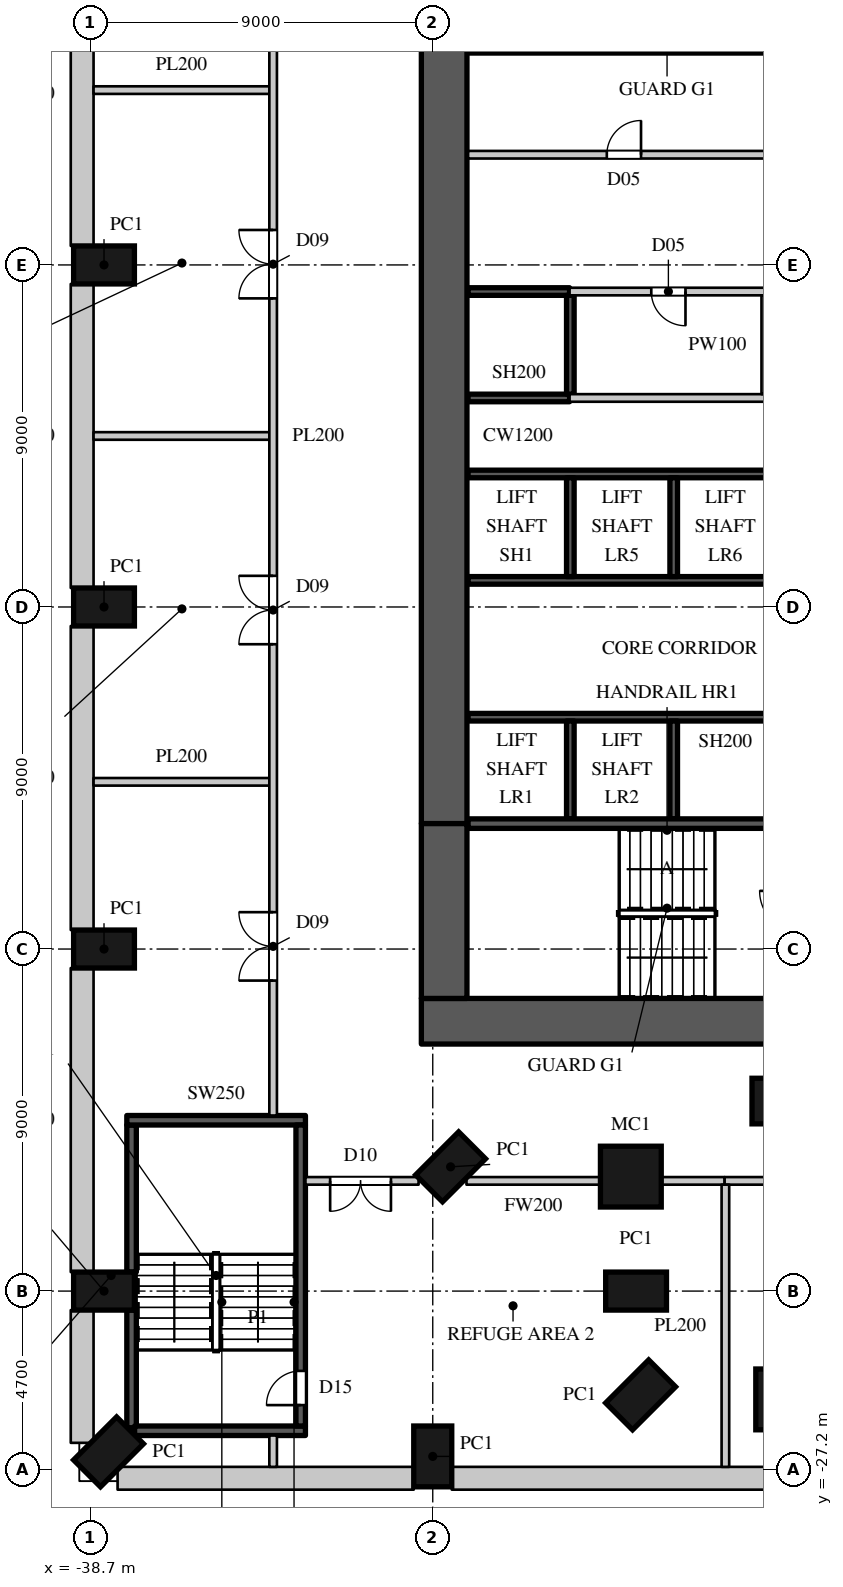
"""IFC4 building model, lengths in metres.
Left out: names, types, materials, properties, quantities, classifications, styles, units other than length and angle.
Written with IfcOpenShell. Run it as: python <this file> out.ifc"""

import sys

from ifc_helpers import new_model, si_unit, direction, frame, frame_2d, origin, origin_2d, place, context, subcontext, project, spatial, rectangle, circle, extrude, element, fill, save


model = new_model("IFC4")
c1 = context("Model", 3, precision=1e-05, world=origin(), true_north=direction((0.0, 1.0)))
c2 = subcontext(c1, "Body", "Model", "MODEL_VIEW")
j1 = project(units=[si_unit("LENGTHUNIT", "METRE"), si_unit("PLANEANGLEUNIT", "RADIAN")], contexts=[c1])
p1 = place(None, origin())
s1 = spatial("IfcSite", under=j1, at=p1, CompositionType="ELEMENT")
p2 = place(p1, origin())
s2 = spatial("IfcBuilding", under=s1, at=p2, CompositionType="ELEMENT")
p3 = place(p2, frame((0.0, 0.0, 29.0)))
s3 = spatial("IfcBuildingStorey", under=s2, at=p3, CompositionType="ELEMENT", Elevation=29.0)
p4 = place(p3, frame((-29.231, -19.231, 0.0), z_axis=(0.0, 0.0, 1.0), x_axis=(0.707106781187, -0.707106781187, 0.0)))
e1 = element("IfcColumn", 1, at=p4, inside=s3, PredefinedType="COLUMN", context=c2, shape_type="SweptSolid", body=[
    extrude(rectangle(XDim=1.0, YDim=1.6, at=origin_2d()), origin(), (0.0, 0.0, 1.0), 7.0),
])
p5 = place(p3, frame((-24.488, -19.488, 0.0), z_axis=(0.0, 0.0, 1.0), x_axis=(1.0, 0.0, 0.0)))
e2 = element("IfcColumn", 2, at=p5, inside=s3, PredefinedType="COLUMN", context=c2, shape_type="SweptSolid", body=[
    extrude(circle(Radius=0.8, at=origin_2d()), origin(), (0.0, 0.0, 1.0), 7.0),
])
for number, where, z_axis, x_axis in (
    (3, (-24.35, -22.5, 0.0), (0.0, 0.0, 1.0), (0.0, -1.0, 0.0)),
    (4, (-24.231, -25.231, 0.0), (0.0, 0.0, 1.0), (0.707, -0.707, 0.0)),
    (5, (-20.7, -25.35, 0.0), (0.0, 0.0, 1.0), (1.0, 0.0, 0.0)),
    (6, (-38.231, -26.731, 0.0), (0.0, 0.0, 1.0), (0.707, -0.707, 0.0)),
    (7, (-29.7, -26.85, 0.0), (0.0, 0.0, 1.0), (1.0, 0.0, 0.0)),
    (8, (-38.35, 4.5, 0.0), (0.0, 0.0, 1.0), (0.0, -1.0, 0.0)),
    (9, (-38.35, -4.5, 0.0), (0.0, 0.0, 1.0), (0.0, -1.0, 0.0)),
    (10, (-38.35, -13.5, 0.0), (0.0, 0.0, 1.0), (0.0, -1.0, 0.0)),
    (11, (-38.35, -22.5, 0.0), (0.0, 0.0, 1.0), (0.0, -1.0, 0.0)),
):
    element("IfcColumn", number, at=place(p3, frame(where, z_axis=z_axis, x_axis=x_axis)), inside=s3, PredefinedType="COLUMN", context=c2, shape_type="SweptSolid", body=[
        extrude(rectangle(XDim=1.0, YDim=1.6, at=origin_2d()), origin(), (0.0, 0.0, 1.0), 7.0),
    ])
p6 = place(p3, frame((-20.7, -17.5, 0.0), z_axis=(0.0, 0.0, 1.0), x_axis=(1.0, 0.0, 0.0)))
e12 = element("IfcColumn", 12, at=p6, inside=s3, PredefinedType="COLUMN", context=c2, shape_type="SweptSolid", body=[
    extrude(circle(Radius=0.6, at=origin_2d()), origin(), (0.0, 0.0, 1.0), 7.0),
])
p7 = place(p3, frame((-37.993, -27.425, 0.0), z_axis=(0.0, 0.0, 1.0), x_axis=(1.0, 0.0, 0.0)))
e13 = element("IfcWall", 13, at=p7, inside=s3, PredefinedType="ELEMENTEDWALL", context=c2, shape_type="SweptSolid", body=[
    extrude(rectangle(XDim=7.793, YDim=0.6, at=frame_2d((3.896, 0.0))), origin(), (0.0, 0.0, 1.0), 6.6),
])
p8 = place(p3, frame((-29.2, -27.425, 0.0), z_axis=(0.0, 0.0, 1.0), x_axis=(1.0, 0.0, 0.0)))
e14 = element("IfcWall", 14, at=p8, inside=s3, PredefinedType="ELEMENTEDWALL", context=c2, shape_type="SweptSolid", body=[
    extrude(rectangle(XDim=53.0, YDim=0.6, at=frame_2d((26.5, 0.0))), origin(), (0.0, 0.0, 1.0), 6.6),
])
for number, where, z_axis, x_axis in (
    (15, (-38.925, 13.0, 0.0), (0.0, 0.0, 1.0), (0.0, -1.0, 0.0)),
    (16, (-38.925, 4.0, 0.0), (0.0, 0.0, 1.0), (0.0, -1.0, 0.0)),
    (17, (-38.925, -5.0, 0.0), (0.0, 0.0, 1.0), (0.0, -1.0, 0.0)),
    (18, (-38.925, -14.0, 0.0), (0.0, 0.0, 1.0), (0.0, -1.0, 0.0)),
):
    element("IfcWall", number, at=place(p3, frame(where, z_axis=z_axis, x_axis=x_axis)), inside=s3, PredefinedType="ELEMENTEDWALL", context=c2, shape_type="SweptSolid", body=[
        extrude(rectangle(XDim=8.0, YDim=0.6, at=frame_2d((4.0, 0.0))), origin(), (0.0, 0.0, 1.0), 6.6),
    ])
p9 = place(p3, frame((-38.925, -23.0, 0.0), z_axis=(0.0, 0.0, 1.0), x_axis=(0.0, -1.0, 0.0)))
e19 = element("IfcWall", 19, at=p9, inside=s3, PredefinedType="ELEMENTEDWALL", context=c2, shape_type="SweptSolid", body=[
    extrude(rectangle(XDim=3.493, YDim=0.6, at=frame_2d((1.747, 0.0))), origin(), (0.0, 0.0, 1.0), 6.6),
])
p10 = place(p3, frame((-30.0, -15.4, 0.0), z_axis=(0.0, 0.0, 1.0), x_axis=(1.0, 0.0, 0.0)))
e20 = element("IfcWall", 20, at=p10, inside=s3, PredefinedType="SHEAR", context=c2, shape_type="SweptSolid", body=[
    extrude(rectangle(XDim=16.0, YDim=1.2, at=frame_2d((8.0, 0.0))), origin(), (0.0, 0.0, 1.0), 7.0),
])
p11 = place(p3, frame((-29.4, -10.2, 0.0), z_axis=(0.0, 0.0, 1.0), x_axis=(0.0, 1.0, 0.0)))
e21 = element("IfcWall", 21, at=p11, inside=s3, PredefinedType="SHEAR", context=c2, shape_type="SweptSolid", body=[
    extrude(rectangle(XDim=20.4, YDim=1.2, at=frame_2d((10.2, 0.0))), origin(), (0.0, 0.0, 1.0), 7.0),
])
p12 = place(p3, frame((-29.4, -14.8, 0.0), z_axis=(0.0, 0.0, 1.0), x_axis=(0.0, 1.0, 0.0)))
e22 = element("IfcWall", 22, at=p12, inside=s3, PredefinedType="SHEAR", context=c2, shape_type="SweptSolid", body=[
    extrude(rectangle(XDim=4.6, YDim=1.2, at=frame_2d((2.3, 0.0))), origin(), (0.0, 0.0, 1.0), 7.0),
])
p13 = place(p3, frame((-33.05, -19.6, 0.0), z_axis=(0.0, 0.0, 1.0), x_axis=(1.0, 0.0, 0.0)))
e23 = element("IfcWall", 23, at=p13, inside=s3, PredefinedType="PARTITIONING", context=c2, shape_type="SweptSolid", body=[
    extrude(rectangle(XDim=2.977, YDim=0.2, at=frame_2d((1.489, 0.0))), origin(), (0.0, 0.0, 1.0), 6.598),
])
p14 = place(p13, frame((0.65, 0.0, 0.0)))
e24 = element("IfcOpeningElement", 24, at=p14, cuts=e23, PredefinedType="OPENING", context=c2, shape_type="SweptSolid", body=[
    extrude(rectangle(XDim=1.6, YDim=2.4, at=frame_2d((0.8, 1.2))), frame((0.0, 0.11, 0.0), z_axis=(0.0, -1.0, 0.0), x_axis=(1.0, 0.0, 0.0)), (0.0, 0.0, 1.0), 0.22),
])
p15 = place(p3, frame((-28.813, -19.6, 0.0), z_axis=(0.0, 0.0, 1.0), x_axis=(1.0, 0.0, 0.0)))
e25 = element("IfcWall", 25, at=p15, inside=s3, PredefinedType="PARTITIONING", context=c2, shape_type="SweptSolid", body=[
    extrude(rectangle(XDim=3.526, YDim=0.2, at=frame_2d((1.763, 0.0))), origin(), (0.0, 0.0, 1.0), 6.598),
])
p16 = place(p3, frame((-23.689, -19.6, 0.0), z_axis=(0.0, 0.0, 1.0), x_axis=(1.0, 0.0, 0.0)))
e26 = element("IfcWall", 26, at=p16, inside=s3, PredefinedType="PARTITIONING", context=c2, shape_type="SweptSolid", body=[
    extrude(rectangle(XDim=1.669, YDim=0.2, at=frame_2d((0.834, 0.0))), origin(), (0.0, 0.0, 1.0), 6.598),
])
p17 = place(p3, frame((-28.77, 7.4, 0.0), z_axis=(0.0, 0.0, 1.0), x_axis=(1.0, 0.0, 0.0)))
e27 = element("IfcWall", 27, at=p17, inside=s3, PredefinedType="PARTITIONING", context=c2, shape_type="SweptSolid", body=[
    extrude(rectangle(XDim=8.15, YDim=0.2, at=frame_2d((4.075, 0.0))), origin(), (0.0, 0.0, 1.0), 6.598),
])
p18 = place(p17, frame((3.65, 0.0, 0.0)))
e28 = element("IfcOpeningElement", 28, at=p18, cuts=e27, PredefinedType="OPENING", context=c2, shape_type="SweptSolid", body=[
    extrude(rectangle(XDim=0.9, YDim=2.2, at=frame_2d((0.45, 1.1))), frame((0.0, 0.11, 0.0), z_axis=(0.0, -1.0, 0.0), x_axis=(1.0, 0.0, 0.0)), (0.0, 0.0, 1.0), 0.22),
])
p19 = place(p3, frame((-26.1, 3.8, 0.0), z_axis=(0.0, 0.0, 1.0), x_axis=(1.0, 0.0, 0.0)))
e29 = element("IfcWall", 29, at=p19, inside=s3, PredefinedType="PARTITIONING", context=c2, shape_type="SweptSolid", body=[
    extrude(rectangle(XDim=10.87, YDim=0.2, at=frame_2d((5.435, 0.0))), origin(), (0.0, 0.0, 1.0), 6.598),
])
p20 = place(p19, frame((2.15, 0.0, 0.0)))
e30 = element("IfcOpeningElement", 30, at=p20, cuts=e29, PredefinedType="OPENING", context=c2, shape_type="SweptSolid", body=[
    extrude(rectangle(XDim=0.9, YDim=2.2, at=frame_2d((0.45, 1.1))), frame((0.0, 0.11, 0.0), z_axis=(0.0, -1.0, 0.0), x_axis=(1.0, 0.0, 0.0)), (0.0, 0.0, 1.0), 0.22),
])
p21 = place(p19, frame((7.45, 0.0, 0.0)))
e31 = element("IfcOpeningElement", 31, at=p21, cuts=e29, PredefinedType="OPENING", context=c2, shape_type="SweptSolid", body=[
    extrude(rectangle(XDim=0.9, YDim=2.2, at=frame_2d((0.45, 1.1))), frame((0.0, 0.11, 0.0), z_axis=(0.0, -1.0, 0.0), x_axis=(1.0, 0.0, 0.0)), (0.0, 0.0, 1.0), 0.22),
])
for number, where, z_axis, x_axis in (
    (32, (-38.625, -9.1, 0.0), (0.0, 0.0, 1.0), (1.0, 0.0, 0.0)),
    (33, (-38.625, 0.0, 0.0), (0.0, 0.0, 1.0), (1.0, 0.0, 0.0)),
    (34, (-38.625, 9.1, 0.0), (0.0, 0.0, 1.0), (1.0, 0.0, 0.0)),
):
    element("IfcWall", number, at=place(p3, frame(where, z_axis=z_axis, x_axis=x_axis)), inside=s3, PredefinedType="PARTITIONING", context=c2, shape_type="SweptSolid", body=[
        extrude(rectangle(XDim=4.625, YDim=0.2, at=frame_2d((2.312, 0.0))), origin(), (0.0, 0.0, 1.0), 6.598),
    ])
p22 = place(p3, frame((-33.9, -27.125, 0.0), z_axis=(0.0, 0.0, 1.0), x_axis=(0.0, 1.0, 0.0)))
e35 = element("IfcWall", 35, at=p22, inside=s3, PredefinedType="PARTITIONING", context=c2, shape_type="SweptSolid", body=[
    extrude(rectangle(XDim=0.825, YDim=0.2, at=frame_2d((0.413, 0.0))), origin(), (0.0, 0.0, 1.0), 6.598),
])
p23 = place(p3, frame((-33.9, -17.88, 0.0), z_axis=(0.0, 0.0, 1.0), x_axis=(0.0, 1.0, 0.0)))
e36 = element("IfcWall", 36, at=p23, inside=s3, PredefinedType="PARTITIONING", context=c2, shape_type="SweptSolid", body=[
    extrude(rectangle(XDim=35.76, YDim=0.2, at=frame_2d((17.88, 0.0))), origin(), (0.0, 0.0, 1.0), 6.598),
])
p24 = place(p23, frame((3.55, 0.0, 0.0)))
e37 = element("IfcOpeningElement", 37, at=p24, cuts=e36, PredefinedType="OPENING", context=c2, shape_type="SweptSolid", body=[
    extrude(rectangle(XDim=1.8, YDim=2.4, at=frame_2d((0.9, 1.2))), frame((0.0, 0.11, 0.0), z_axis=(0.0, -1.0, 0.0), x_axis=(1.0, 0.0, 0.0)), (0.0, 0.0, 1.0), 0.22),
])
p25 = place(p23, frame((12.4, 0.0, 0.0)))
e38 = element("IfcOpeningElement", 38, at=p25, cuts=e36, PredefinedType="OPENING", context=c2, shape_type="SweptSolid", body=[
    extrude(rectangle(XDim=1.8, YDim=2.4, at=frame_2d((0.9, 1.2))), frame((0.0, 0.11, 0.0), z_axis=(0.0, -1.0, 0.0), x_axis=(1.0, 0.0, 0.0)), (0.0, 0.0, 1.0), 0.22),
])
p26 = place(p23, frame((21.5, 0.0, 0.0)))
e39 = element("IfcOpeningElement", 39, at=p26, cuts=e36, PredefinedType="OPENING", context=c2, shape_type="SweptSolid", body=[
    extrude(rectangle(XDim=1.8, YDim=2.4, at=frame_2d((0.9, 1.2))), frame((0.0, 0.11, 0.0), z_axis=(0.0, -1.0, 0.0), x_axis=(1.0, 0.0, 0.0)), (0.0, 0.0, 1.0), 0.22),
])
p27 = place(p23, frame((30.4, 0.0, 0.0)))
e40 = element("IfcOpeningElement", 40, at=p27, cuts=e36, PredefinedType="OPENING", context=c2, shape_type="SweptSolid", body=[
    extrude(rectangle(XDim=1.8, YDim=2.4, at=frame_2d((0.9, 1.2))), frame((0.0, 0.11, 0.0), z_axis=(0.0, -1.0, 0.0), x_axis=(1.0, 0.0, 0.0)), (0.0, 0.0, 1.0), 0.22),
])
p28 = place(p3, frame((-26.1, 1.0, 0.0), z_axis=(0.0, 0.0, 1.0), x_axis=(1.0, 0.0, 0.0)))
e41 = element("IfcWall", 41, at=p28, inside=s3, PredefinedType="PARTITIONING", context=c2, shape_type="SweptSolid", body=[
    extrude(rectangle(XDim=10.87, YDim=0.2, at=frame_2d((5.435, 0.0))), origin(), (0.0, 0.0, 1.0), 6.598),
])
p29 = place(p3, frame((-22.02, -19.6, 0.0), z_axis=(0.0, 0.0, 1.0), x_axis=(1.0, 0.0, 0.0)))
e42 = element("IfcWall", 42, at=p29, inside=s3, PredefinedType="PARTITIONING", context=c2, shape_type="SweptSolid", body=[
    extrude(rectangle(XDim=9.02, YDim=0.2, at=frame_2d((4.51, 0.0))), origin(), (0.0, 0.0, 1.0), 6.598),
])
p30 = place(p29, frame((3.6, 0.0, 0.0)))
e43 = element("IfcOpeningElement", 43, at=p30, cuts=e42, PredefinedType="OPENING", context=c2, shape_type="SweptSolid", body=[
    extrude(rectangle(XDim=1.8, YDim=2.4, at=frame_2d((0.9, 1.2))), frame((0.0, 0.11, 0.0), z_axis=(0.0, -1.0, 0.0), x_axis=(1.0, 0.0, 0.0)), (0.0, 0.0, 1.0), 0.22),
])
p31 = place(p3, frame((-22.0, -27.125, 0.0), z_axis=(0.0, 0.0, 1.0), x_axis=(0.0, 1.0, 0.0)))
e44 = element("IfcWall", 44, at=p31, inside=s3, PredefinedType="PARTITIONING", context=c2, shape_type="SweptSolid", body=[
    extrude(rectangle(XDim=7.425, YDim=0.2, at=frame_2d((3.712, 0.0))), origin(), (0.0, 0.0, 1.0), 6.598),
])
for number, where, z_axis, x_axis in (
    (45, (-28.77, -7.4, 0.0), (0.0, 0.0, 1.0), (1.0, 0.0, 0.0)),
    (46, (-28.77, -3.8, 0.0), (0.0, 0.0, 1.0), (1.0, 0.0, 0.0)),
    (47, (-28.77, -1.0, 0.0), (0.0, 0.0, 1.0), (1.0, 0.0, 0.0)),
):
    element("IfcWall", number, at=place(p3, frame(where, z_axis=z_axis, x_axis=x_axis)), inside=s3, PredefinedType="SHEAR", context=c2, shape_type="SweptSolid", body=[
        extrude(rectangle(XDim=13.54, YDim=0.2, at=frame_2d((6.77, 0.0))), origin(), (0.0, 0.0, 1.0), 6.598),
    ])
for number, where, z_axis, x_axis in (
    (48, (-28.77, 1.0, 0.0), (0.0, 0.0, 1.0), (1.0, 0.0, 0.0)),
    (49, (-28.77, 3.8, 0.0), (0.0, 0.0, 1.0), (1.0, 0.0, 0.0)),
):
    element("IfcWall", number, at=place(p3, frame(where, z_axis=z_axis, x_axis=x_axis)), inside=s3, PredefinedType="SHEAR", context=c2, shape_type="SweptSolid", body=[
        extrude(rectangle(XDim=2.67, YDim=0.2, at=frame_2d((1.335, 0.0))), origin(), (0.0, 0.0, 1.0), 6.598),
    ])
p32 = place(p3, frame((-26.08, -10.075, 0.0), z_axis=(0.0, 0.0, 1.0), x_axis=(0.0, 1.0, 0.0)))
e50 = element("IfcWall", 50, at=p32, inside=s3, PredefinedType="SHEAR", context=c2, shape_type="SweptSolid", body=[
    extrude(rectangle(XDim=2.575, YDim=0.2, at=frame_2d((1.288, 0.0))), origin(), (0.0, 0.0, 1.0), 7.0),
])
p33 = place(p3, frame((-26.08, -3.7, 0.0), z_axis=(0.0, 0.0, 1.0), x_axis=(0.0, 1.0, 0.0)))
e51 = element("IfcWall", 51, at=p33, inside=s3, PredefinedType="SHEAR", context=c2, shape_type="SweptSolid", body=[
    extrude(rectangle(XDim=2.6, YDim=0.2, at=frame_2d((1.3, 0.0))), origin(), (0.0, 0.0, 1.0), 7.0),
])
p34 = place(p3, frame((-26.08, 1.1, 0.0), z_axis=(0.0, 0.0, 1.0), x_axis=(0.0, 1.0, 0.0)))
e52 = element("IfcWall", 52, at=p34, inside=s3, PredefinedType="SHEAR", context=c2, shape_type="SweptSolid", body=[
    extrude(rectangle(XDim=2.6, YDim=0.2, at=frame_2d((1.3, 0.0))), origin(), (0.0, 0.0, 1.0), 6.598),
])
p35 = place(p3, frame((-23.36, -10.075, 0.0), z_axis=(0.0, 0.0, 1.0), x_axis=(0.0, 1.0, 0.0)))
e53 = element("IfcWall", 53, at=p35, inside=s3, PredefinedType="SHEAR", context=c2, shape_type="SweptSolid", body=[
    extrude(rectangle(XDim=2.575, YDim=0.2, at=frame_2d((1.288, 0.0))), origin(), (0.0, 0.0, 1.0), 7.0),
])
p36 = place(p3, frame((-23.36, -3.7, 0.0), z_axis=(0.0, 0.0, 1.0), x_axis=(0.0, 1.0, 0.0)))
e54 = element("IfcWall", 54, at=p36, inside=s3, PredefinedType="SHEAR", context=c2, shape_type="SweptSolid", body=[
    extrude(rectangle(XDim=2.6, YDim=0.2, at=frame_2d((1.3, 0.0))), origin(), (0.0, 0.0, 1.0), 7.0),
])
p37 = place(p3, frame((-37.625, -26.095, 0.0), z_axis=(0.0, 0.0, 1.0), x_axis=(0.0, 1.0, 0.0)))
e55 = element("IfcWall", 55, at=p37, inside=s3, PredefinedType="SHEAR", context=c2, shape_type="SweptSolid", body=[
    extrude(rectangle(XDim=3.095, YDim=0.25, at=frame_2d((1.548, 0.0))), origin(), (0.0, 0.0, 1.0), 6.6),
])
p38 = place(p3, frame((-37.625, -22.0, 0.0), z_axis=(0.0, 0.0, 1.0), x_axis=(0.0, 1.0, 0.0)))
e56 = element("IfcWall", 56, at=p38, inside=s3, PredefinedType="SHEAR", context=c2, shape_type="SweptSolid", body=[
    extrude(rectangle(XDim=3.87, YDim=0.25, at=frame_2d((1.935, 0.0))), origin(), (0.0, 0.0, 1.0), 6.6),
])
p39 = place(p3, frame((-37.545, -26.175, 0.0), z_axis=(0.0, 0.0, 1.0), x_axis=(1.0, 0.0, 0.0)))
e57 = element("IfcWall", 57, at=p39, inside=s3, PredefinedType="SHEAR", context=c2, shape_type="SweptSolid", body=[
    extrude(rectangle(XDim=4.495, YDim=0.25, at=frame_2d((2.248, 0.0))), origin(), (0.0, 0.0, 1.0), 6.6),
])
p40 = place(p3, frame((-37.75, -18.005, 0.0), z_axis=(0.0, 0.0, 1.0), x_axis=(1.0, 0.0, 0.0)))
e58 = element("IfcWall", 58, at=p40, inside=s3, PredefinedType="SHEAR", context=c2, shape_type="SweptSolid", body=[
    extrude(rectangle(XDim=4.7, YDim=0.25, at=frame_2d((2.35, 0.0))), origin(), (0.0, 0.0, 1.0), 6.6),
])
p41 = place(p3, frame((-33.175, -26.05, 0.0), z_axis=(0.0, 0.0, 1.0), x_axis=(0.0, 1.0, 0.0)))
e59 = element("IfcWall", 59, at=p41, inside=s3, PredefinedType="SHEAR", context=c2, shape_type="SweptSolid", body=[
    extrude(rectangle(XDim=7.92, YDim=0.25, at=frame_2d((3.96, 0.0))), origin(), (0.0, 0.0, 1.0), 6.6),
])
p42 = place(p41, frame((0.55, 0.0, 0.0)))
e60 = element("IfcOpeningElement", 60, at=p42, cuts=e59, PredefinedType="OPENING", context=c2, shape_type="SweptSolid", body=[
    extrude(rectangle(XDim=0.9, YDim=2.2, at=frame_2d((0.45, 1.1))), frame((0.0, 0.135, 0.0), z_axis=(0.0, -1.0, 0.0), x_axis=(1.0, 0.0, 0.0)), (0.0, 0.0, 1.0), 0.27),
])
for number, where, z_axis, x_axis in (
    (61, (-28.77, -10.2, 0.0), (0.0, 0.0, 1.0), (1.0, 0.0, 0.0)),
    (62, (-28.77, 10.2, 0.0), (0.0, 0.0, 1.0), (1.0, 0.0, 0.0)),
):
    element("IfcWall", number, at=place(p3, frame(where, z_axis=z_axis, x_axis=x_axis)), inside=s3, PredefinedType="SHEAR", context=c2, shape_type="SweptSolid", body=[
        extrude(rectangle(XDim=8.79, YDim=0.25, at=frame_2d((4.395, 0.0))), origin(), (0.0, 0.0, 1.0), 6.598),
    ])
p43 = place(p3, frame((-21.0, 1.1, 0.0), z_axis=(0.0, 0.0, 1.0), x_axis=(0.0, 1.0, 0.0)))
e63 = element("IfcWall", 63, at=p43, inside=s3, PredefinedType="PARTITIONING", context=c2, shape_type="SweptSolid", body=[
    extrude(rectangle(XDim=2.6, YDim=0.1, at=frame_2d((1.3, 0.0))), origin(), (0.0, 0.0, 1.0), 6.598),
])
p44 = place(p20, origin())
e64 = element("IfcDoor", 64, at=p44, inside=s3, OperationType="SINGLE_SWING_LEFT", PredefinedType="DOOR", context=c2, shape_type="SweptSolid", body=[
    extrude(rectangle(XDim=0.9, YDim=2.2, at=frame_2d((0.45, 1.1))), frame((0.0, 0.025, 0.0), z_axis=(0.0, -1.0, 0.0), x_axis=(1.0, 0.0, 0.0)), (0.0, 0.0, 1.0), 0.05),
])
fill(e30, e64)
p45 = place(p18, origin())
e65 = element("IfcDoor", 65, at=p45, inside=s3, OperationType="SINGLE_SWING_RIGHT", PredefinedType="DOOR", context=c2, shape_type="SweptSolid", body=[
    extrude(rectangle(XDim=0.9, YDim=2.2, at=frame_2d((0.45, 1.1))), frame((0.0, 0.025, 0.0), z_axis=(0.0, -1.0, 0.0), x_axis=(1.0, 0.0, 0.0)), (0.0, 0.0, 1.0), 0.05),
])
fill(e28, e65)
p46 = place(p14, origin())
e66 = element("IfcDoor", 66, at=p46, inside=s3, OperationType="DOUBLE_DOOR_SINGLE_SWING", PredefinedType="DOOR", context=c2, shape_type="SweptSolid", body=[
    extrude(rectangle(XDim=1.6, YDim=2.4, at=frame_2d((0.8, 1.2))), frame((0.0, 0.025, 0.0), z_axis=(0.0, -1.0, 0.0), x_axis=(1.0, 0.0, 0.0)), (0.0, 0.0, 1.0), 0.05),
])
fill(e24, e66)
p47 = place(p24, origin())
e67 = element("IfcDoor", 67, at=p47, inside=s3, OperationType="DOUBLE_DOOR_SINGLE_SWING", PredefinedType="DOOR", context=c2, shape_type="SweptSolid", body=[
    extrude(rectangle(XDim=1.8, YDim=2.4, at=frame_2d((0.9, 1.2))), frame((0.0, 0.025, 0.0), z_axis=(0.0, -1.0, 0.0), x_axis=(1.0, 0.0, 0.0)), (0.0, 0.0, 1.0), 0.05),
])
fill(e37, e67)
p48 = place(p25, origin())
e68 = element("IfcDoor", 68, at=p48, inside=s3, OperationType="DOUBLE_DOOR_SINGLE_SWING", PredefinedType="DOOR", context=c2, shape_type="SweptSolid", body=[
    extrude(rectangle(XDim=1.8, YDim=2.4, at=frame_2d((0.9, 1.2))), frame((0.0, 0.025, 0.0), z_axis=(0.0, -1.0, 0.0), x_axis=(1.0, 0.0, 0.0)), (0.0, 0.0, 1.0), 0.05),
])
fill(e38, e68)
p49 = place(p26, origin())
e69 = element("IfcDoor", 69, at=p49, inside=s3, OperationType="DOUBLE_DOOR_SINGLE_SWING", PredefinedType="DOOR", context=c2, shape_type="SweptSolid", body=[
    extrude(rectangle(XDim=1.8, YDim=2.4, at=frame_2d((0.9, 1.2))), frame((0.0, 0.025, 0.0), z_axis=(0.0, -1.0, 0.0), x_axis=(1.0, 0.0, 0.0)), (0.0, 0.0, 1.0), 0.05),
])
fill(e39, e69)
p50 = place(p42, origin())
e70 = element("IfcDoor", 70, at=p50, inside=s3, OperationType="SINGLE_SWING_LEFT", PredefinedType="DOOR", context=c2, shape_type="SweptSolid", body=[
    extrude(rectangle(XDim=0.9, YDim=2.2, at=frame_2d((0.45, 1.1))), frame((0.0, 0.025, 0.0), z_axis=(0.0, -1.0, 0.0), x_axis=(1.0, 0.0, 0.0)), (0.0, 0.0, 1.0), 0.05),
])
fill(e60, e70)
save(model, sys.argv[1])
